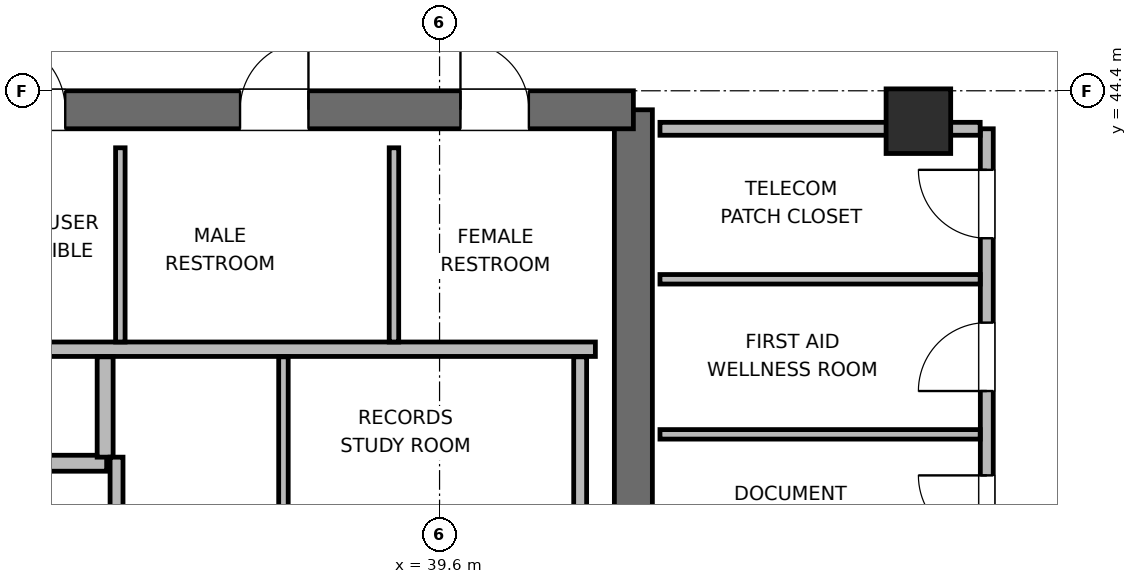
"""IFC4 building model, lengths in metres.
Left out: names, types, materials, properties, quantities, classifications, styles, units other than length and angle.
Written with IfcOpenShell. Run it as: python <this file> out.ifc"""

import sys

from ifc_helpers import new_model, si_unit, direction, frame, frame_2d, origin, origin_2d, place, context, subcontext, project, spatial, rectangle, extrude, element, fill, save


model = new_model("IFC4")
c1 = context("Model", 3, precision=1e-05, world=origin(), true_north=direction((0.0, 1.0)))
c2 = subcontext(c1, "Body", "Model", "MODEL_VIEW")
j1 = project(units=[si_unit("LENGTHUNIT", "METRE"), si_unit("PLANEANGLEUNIT", "RADIAN")], contexts=[c1])
p1 = place(None, origin())
s1 = spatial("IfcSite", under=j1, at=p1, CompositionType="ELEMENT")
p2 = place(p1, origin())
s2 = spatial("IfcBuilding", under=s1, at=p2, CompositionType="ELEMENT")
p3 = place(p2, frame((0.0, 0.0, 278.4)))
s3 = spatial("IfcBuildingStorey", under=s2, at=p3, CompositionType="ELEMENT", Elevation=278.4)
p4 = place(p3, frame((42.15, 37.8, 0.0), z_axis=(0.0, 0.0, 1.0), x_axis=(0.0, 1.0, 0.0)))
e1 = element("IfcWall", 1, at=p4, inside=s3, PredefinedType="SHEAR", context=c2, shape_type="SweptSolid", body=[
    extrude(rectangle(XDim=6.35, YDim=0.5, at=frame_2d((3.175, 0.0))), origin(), (0.0, 0.0, 1.0), 3.9),
])
p5 = place(p3, frame((32.65, 44.15, 0.0), z_axis=(0.0, 0.0, 1.0), x_axis=(1.0, 0.0, 0.0)))
e2 = element("IfcWall", 2, at=p5, inside=s3, PredefinedType="SHEAR", context=c2, shape_type="SweptSolid", body=[
    extrude(rectangle(XDim=9.5, YDim=0.5, at=frame_2d((4.75, 0.0))), origin(), (0.0, 0.0, 1.0), 3.9),
])
p6 = place(p5, frame((1.075, 0.0, 0.0)))
e3 = element("IfcOpeningElement", 3, at=p6, cuts=e2, PredefinedType="OPENING", context=c2, shape_type="SweptSolid", body=[
    extrude(rectangle(XDim=0.95, YDim=2.04, at=frame_2d((0.475, 1.02))), frame((0.0, 0.26, 0.0), z_axis=(0.0, -1.0, 0.0), x_axis=(1.0, 0.0, 0.0)), (0.0, 0.0, 1.0), 0.52),
])
p7 = place(p5, frame((4.325, 0.0, 0.0)))
e4 = element("IfcOpeningElement", 4, at=p7, cuts=e2, PredefinedType="OPENING", context=c2, shape_type="SweptSolid", body=[
    extrude(rectangle(XDim=0.9, YDim=2.02, at=frame_2d((0.45, 1.01))), frame((0.0, 0.26, 0.0), z_axis=(0.0, -1.0, 0.0), x_axis=(1.0, 0.0, 0.0)), (0.0, 0.0, 1.0), 0.52),
])
p8 = place(p5, frame((7.225, 0.0, 0.0)))
e5 = element("IfcOpeningElement", 5, at=p8, cuts=e2, PredefinedType="OPENING", context=c2, shape_type="SweptSolid", body=[
    extrude(rectangle(XDim=0.9, YDim=2.02, at=frame_2d((0.45, 1.01))), frame((0.0, 0.26, 0.0), z_axis=(0.0, -1.0, 0.0), x_axis=(1.0, 0.0, 0.0)), (0.0, 0.0, 1.0), 0.52),
])
p9 = place(p3, frame((45.9, 44.0, 0.0), z_axis=(0.0, 0.0, 1.0), x_axis=(1.0, 0.0, 0.0)))
e6 = element("IfcColumn", 6, at=p9, inside=s3, PredefinedType="COLUMN", context=c2, shape_type="SweptSolid", body=[
    extrude(rectangle(XDim=0.85, YDim=0.85, at=origin_2d()), origin(), (0.0, 0.0, 1.0), 3.9),
])
p10 = place(p3, frame((33.15, 41.0, 0.0), z_axis=(0.0, 0.0, 1.0), x_axis=(1.0, 0.0, 0.0)))
e7 = element("IfcWall", 7, at=p10, inside=s3, PredefinedType="PLUMBINGWALL", context=c2, shape_type="SweptSolid", body=[
    extrude(rectangle(XDim=8.5, YDim=0.19, at=frame_2d((4.25, 0.0))), origin(), (0.0, 0.0, 1.0), 3.6),
])
for number, where, z_axis, x_axis in (
    (8, (35.4, 41.095, 0.0), (0.0, 0.0, 1.0), (0.0, 1.0, 0.0)),
    (9, (39.0, 41.095, 0.0), (0.0, 0.0, 1.0), (0.0, 1.0, 0.0)),
):
    element("IfcWall", number, at=place(p3, frame(where, z_axis=z_axis, x_axis=x_axis)), inside=s3, PredefinedType="PARTITIONING", context=c2, shape_type="SweptSolid", body=[
        extrude(rectangle(XDim=2.555, YDim=0.125, at=frame_2d((1.277, 0.0))), origin(), (0.0, 0.0, 1.0), 3.6),
    ])
p11 = place(p3, frame((33.36, 39.5, 0.0), z_axis=(0.0, 0.0, 1.0), x_axis=(1.0, 0.0, 0.0)))
e10 = element("IfcWall", 10, at=p11, inside=s3, PredefinedType="PARTITIONING", context=c2, shape_type="SweptSolid", body=[
    extrude(rectangle(XDim=1.86, YDim=0.21, at=frame_2d((0.93, 0.0))), origin(), (0.0, 0.0, 1.0), 3.6),
])
p12 = place(p3, frame((35.2, 39.58, 0.0), z_axis=(0.0, 0.0, 1.0), x_axis=(0.0, 1.0, 0.0)))
e11 = element("IfcWall", 11, at=p12, inside=s3, PredefinedType="PARTITIONING", context=c2, shape_type="SweptSolid", body=[
    extrude(rectangle(XDim=1.32, YDim=0.21, at=frame_2d((0.66, 0.0))), origin(), (0.0, 0.0, 1.0), 3.6),
])
p13 = place(p3, frame((35.35, 38.087, 0.0), z_axis=(0.0, 0.0, 1.0), x_axis=(0.0, 1.0, 0.0)))
e12 = element("IfcWall", 12, at=p13, inside=s3, PredefinedType="PARTITIONING", context=c2, shape_type="SweptSolid", body=[
    extrude(rectangle(XDim=1.493, YDim=0.17, at=frame_2d((0.747, 0.0))), origin(), (0.0, 0.0, 1.0), 3.6),
])
p14 = place(p3, frame((41.45, 38.087, 0.0), z_axis=(0.0, 0.0, 1.0), x_axis=(0.0, 1.0, 0.0)))
e13 = element("IfcWall", 13, at=p14, inside=s3, PredefinedType="PARTITIONING", context=c2, shape_type="SweptSolid", body=[
    extrude(rectangle(XDim=2.813, YDim=0.17, at=frame_2d((1.406, 0.0))), origin(), (0.0, 0.0, 1.0), 3.6),
])
p15 = place(p3, frame((37.546, 38.087, 0.0), z_axis=(0.0, 0.0, 1.0), x_axis=(0.0, 1.0, 0.0)))
e14 = element("IfcWall", 14, at=p15, inside=s3, PredefinedType="PARTITIONING", context=c2, shape_type="SweptSolid", body=[
    extrude(rectangle(XDim=2.813, YDim=0.125, at=frame_2d((1.406, 0.0))), origin(), (0.0, 0.0, 1.0), 3.6),
])
p16 = place(p3, frame((46.8, 37.9, 0.0), z_axis=(0.0, 0.0, 1.0), x_axis=(0.0, 1.0, 0.0)))
e15 = element("IfcWall", 15, at=p16, inside=s3, PredefinedType="PARTITIONING", context=c2, shape_type="SweptSolid", body=[
    extrude(rectangle(XDim=6.0, YDim=0.17, at=frame_2d((3.0, 0.0))), origin(), (0.0, 0.0, 1.0), 3.6),
])
p17 = place(p16, frame((0.54, 0.0, 0.0)))
e16 = element("IfcOpeningElement", 16, at=p17, cuts=e15, PredefinedType="OPENING", context=c2, shape_type="SweptSolid", body=[
    extrude(rectangle(XDim=0.9, YDim=2.02, at=frame_2d((0.45, 1.01))), frame((0.0, 0.095, 0.0), z_axis=(0.0, -1.0, 0.0), x_axis=(1.0, 0.0, 0.0)), (0.0, 0.0, 1.0), 0.19),
])
p18 = place(p16, frame((2.55, 0.0, 0.0)))
e17 = element("IfcOpeningElement", 17, at=p18, cuts=e15, PredefinedType="OPENING", context=c2, shape_type="SweptSolid", body=[
    extrude(rectangle(XDim=0.9, YDim=2.02, at=frame_2d((0.45, 1.01))), frame((0.0, 0.095, 0.0), z_axis=(0.0, -1.0, 0.0), x_axis=(1.0, 0.0, 0.0)), (0.0, 0.0, 1.0), 0.19),
])
p19 = place(p16, frame((4.56, 0.0, 0.0)))
e18 = element("IfcOpeningElement", 18, at=p19, cuts=e15, PredefinedType="OPENING", context=c2, shape_type="SweptSolid", body=[
    extrude(rectangle(XDim=0.9, YDim=2.02, at=frame_2d((0.45, 1.01))), frame((0.0, 0.095, 0.0), z_axis=(0.0, -1.0, 0.0), x_axis=(1.0, 0.0, 0.0)), (0.0, 0.0, 1.0), 0.19),
])
p20 = place(p3, frame((42.5, 43.9, 0.0), z_axis=(0.0, 0.0, 1.0), x_axis=(1.0, 0.0, 0.0)))
e19 = element("IfcWall", 19, at=p20, inside=s3, PredefinedType="PARTITIONING", context=c2, shape_type="SweptSolid", body=[
    extrude(rectangle(XDim=4.213, YDim=0.17, at=frame_2d((2.106, 0.0))), origin(), (0.0, 0.0, 1.0), 2.685),
])
for number, where, z_axis, x_axis in (
    (20, (42.5, 39.88, 0.0), (0.0, 0.0, 1.0), (1.0, 0.0, 0.0)),
    (21, (42.5, 41.92, 0.0), (0.0, 0.0, 1.0), (1.0, 0.0, 0.0)),
):
    element("IfcWall", number, at=place(p3, frame(where, z_axis=z_axis, x_axis=x_axis)), inside=s3, PredefinedType="PARTITIONING", context=c2, shape_type="SweptSolid", body=[
        extrude(rectangle(XDim=4.213, YDim=0.125, at=frame_2d((2.106, 0.0))), origin(), (0.0, 0.0, 1.0), 3.6),
    ])
p21 = place(p6, origin())
e22 = element("IfcDoor", 22, at=p21, inside=s3, OperationType="SINGLE_SWING_LEFT", PredefinedType="DOOR", context=c2, shape_type="SweptSolid", body=[
    extrude(rectangle(XDim=0.95, YDim=2.04, at=frame_2d((0.475, 1.02))), frame((0.0, 0.025, 0.0), z_axis=(0.0, -1.0, 0.0), x_axis=(1.0, 0.0, 0.0)), (0.0, 0.0, 1.0), 0.05),
])
fill(e3, e22)
p22 = place(p7, origin())
e23 = element("IfcDoor", 23, at=p22, inside=s3, OperationType="SINGLE_SWING_RIGHT", PredefinedType="DOOR", context=c2, shape_type="SweptSolid", body=[
    extrude(rectangle(XDim=0.9, YDim=2.02, at=frame_2d((0.45, 1.01))), frame((0.0, 0.025, 0.0), z_axis=(0.0, -1.0, 0.0), x_axis=(1.0, 0.0, 0.0)), (0.0, 0.0, 1.0), 0.05),
])
fill(e4, e23)
p23 = place(p8, origin())
e24 = element("IfcDoor", 24, at=p23, inside=s3, OperationType="SINGLE_SWING_LEFT", PredefinedType="DOOR", context=c2, shape_type="SweptSolid", body=[
    extrude(rectangle(XDim=0.9, YDim=2.02, at=frame_2d((0.45, 1.01))), frame((0.0, 0.025, 0.0), z_axis=(0.0, -1.0, 0.0), x_axis=(1.0, 0.0, 0.0)), (0.0, 0.0, 1.0), 0.05),
])
fill(e5, e24)
p24 = place(p17, origin())
e25 = element("IfcDoor", 25, at=p24, inside=s3, OperationType="SINGLE_SWING_RIGHT", PredefinedType="DOOR", context=c2, shape_type="SweptSolid", body=[
    extrude(rectangle(XDim=0.9, YDim=2.02, at=frame_2d((0.45, 1.01))), frame((0.0, 0.025, 0.0), z_axis=(0.0, -1.0, 0.0), x_axis=(1.0, 0.0, 0.0)), (0.0, 0.0, 1.0), 0.05),
])
fill(e16, e25)
p25 = place(p18, origin())
e26 = element("IfcDoor", 26, at=p25, inside=s3, OperationType="SINGLE_SWING_LEFT", PredefinedType="DOOR", context=c2, shape_type="SweptSolid", body=[
    extrude(rectangle(XDim=0.9, YDim=2.02, at=frame_2d((0.45, 1.01))), frame((0.0, 0.025, 0.0), z_axis=(0.0, -1.0, 0.0), x_axis=(1.0, 0.0, 0.0)), (0.0, 0.0, 1.0), 0.05),
])
fill(e17, e26)
p26 = place(p19, origin())
e27 = element("IfcDoor", 27, at=p26, inside=s3, OperationType="SINGLE_SWING_RIGHT", PredefinedType="DOOR", context=c2, shape_type="SweptSolid", body=[
    extrude(rectangle(XDim=0.9, YDim=2.02, at=frame_2d((0.45, 1.01))), frame((0.0, 0.025, 0.0), z_axis=(0.0, -1.0, 0.0), x_axis=(1.0, 0.0, 0.0)), (0.0, 0.0, 1.0), 0.05),
])
fill(e18, e27)
save(model, sys.argv[1])
